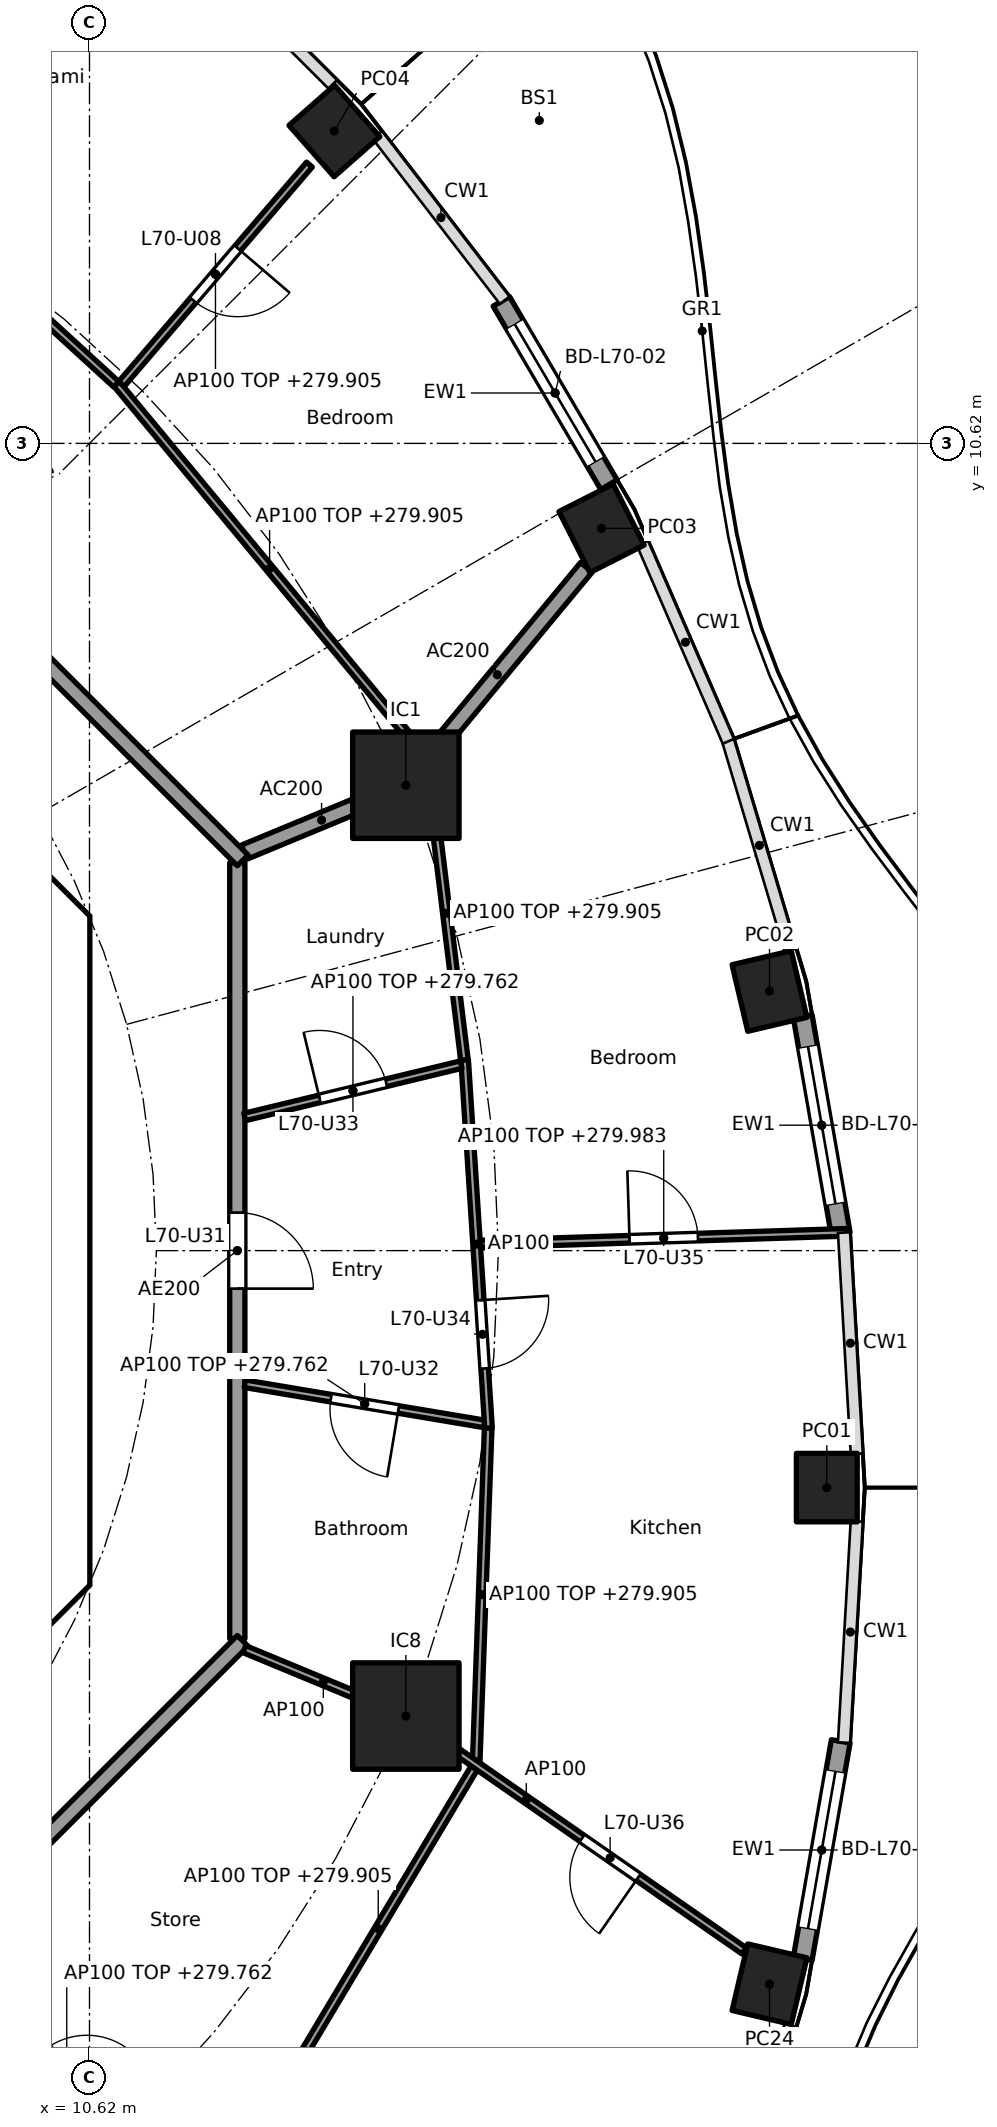
"""IFC4 building model, lengths in metres.
Left out: names, types, materials, properties, quantities, classifications, styles, units other than length and angle.
Written with IfcOpenShell. Run it as: python <this file> out.ifc"""

import sys

from ifc_helpers import new_model, si_unit, direction, frame, frame_2d, origin, origin_2d, place, context, subcontext, project, spatial, polyline, rectangle, hollow_rectangle, outline, extrude, element, fill, save


model = new_model("IFC4")
c1 = context("Model", 3, precision=1e-05, world=origin(), true_north=direction((0.0, 1.0)))
c2 = subcontext(c1, "Body", "Model", "MODEL_VIEW")
j1 = project(units=[si_unit("LENGTHUNIT", "METRE"), si_unit("PLANEANGLEUNIT", "RADIAN")], contexts=[c1])
p1 = place(None, origin())
s1 = spatial("IfcSite", under=j1, at=p1, CompositionType="ELEMENT")
p2 = place(p1, origin())
s2 = spatial("IfcBuilding", under=s1, at=p2, CompositionType="ELEMENT")
p3 = place(p2, frame((0.0, 0.0, 277.0)))
s3 = spatial("IfcBuildingStorey", under=s2, at=p3, CompositionType="ELEMENT", Elevation=277.0)
for number, where, z_axis, x_axis in (
    (1, (20.32, -3.118, 0.0), (0.0, 0.0, 1.0), (0.0, 1.0, 0.0)),
    (2, (19.566, 3.415, 0.0), (0.0, 0.0, 1.0), (-0.229, 0.973, 0.0)),
    (3, (17.356, 9.502, 0.0), (0.0, 0.0, 1.0), (-0.452, 0.892, 0.0)),
    (4, (13.841, 14.73, 0.0), (0.0, 0.0, 1.0), (-0.66, 0.751, 0.0)),
    (5, (19.566, -9.65, 0.0), (0.0, 0.0, 1.0), (0.229, 0.973, 0.0)),
):
    element("IfcColumn", number, at=place(p3, frame(where, z_axis=z_axis, x_axis=x_axis)), inside=s3, PredefinedType="COLUMN", context=c2, shape_type="SweptSolid", body=[
        extrude(hollow_rectangle(XDim=0.9, YDim=0.8, WallThickness=0.028, at=origin_2d()), origin(), (0.0, 0.0, 1.0), 3.7),
    ])
for number, where, z_axis, x_axis in (
    (6, (14.782, 6.123, 0.0), (0.0, 0.0, 1.0), (1.0, 0.0, 0.0)),
    (7, (14.782, -6.123, 0.0), (0.0, 0.0, 1.0), (1.0, 0.0, 0.0)),
):
    element("IfcColumn", number, at=place(p3, frame(where, z_axis=z_axis, x_axis=x_axis)), inside=s3, PredefinedType="COLUMN", context=c2, shape_type="SweptSolid", body=[
        extrude(rectangle(XDim=1.4, YDim=1.4, at=origin_2d()), origin(), (0.0, 0.0, 1.0), 3.7),
    ])
p4 = place(p3, frame((20.004, 3.08, 0.0), z_axis=(0.0, 0.0, 1.0), x_axis=(0.172182411767, -0.985065082661, 0.0)))
e8 = element("IfcWall", 8, at=p4, inside=s3, PredefinedType="SOLIDWALL", context=c2, shape_type="SweptSolid", body=[
    extrude(rectangle(XDim=2.903, YDim=0.25, at=frame_2d((1.451, 0.0))), origin(), (0.0, 0.0, 1.0), 3.44),
])
p5 = place(p4, frame((0.401, 0.0, 0.0)))
e9 = element("IfcOpeningElement", 9, at=p5, cuts=e8, PredefinedType="OPENING", context=c2, shape_type="SweptSolid", body=[
    extrude(rectangle(XDim=2.1, YDim=2.4, at=frame_2d((1.05, 1.2))), frame((0.0, 0.135, 0.0), z_axis=(0.0, -1.0, 0.0), x_axis=(1.0, 0.0, 0.0)), (0.0, 0.0, 1.0), 0.27),
])
p6 = place(p3, frame((16.038, 12.489, 0.0), z_axis=(0.0, 0.0, 1.0), x_axis=(0.506371364425, -0.862315511452, 0.0)))
e10 = element("IfcWall", 10, at=p6, inside=s3, PredefinedType="SOLIDWALL", context=c2, shape_type="SweptSolid", body=[
    extrude(rectangle(XDim=2.796, YDim=0.25, at=frame_2d((1.398, 0.0))), origin(), (0.0, 0.0, 1.0), 3.44),
])
p7 = place(p6, frame((0.348, 0.0, 0.0)))
e11 = element("IfcOpeningElement", 11, at=p7, cuts=e10, PredefinedType="OPENING", context=c2, shape_type="SweptSolid", body=[
    extrude(rectangle(XDim=2.1, YDim=2.4, at=frame_2d((1.05, 1.2))), frame((0.0, 0.135, 0.0), z_axis=(0.0, -1.0, 0.0), x_axis=(1.0, 0.0, 0.0)), (0.0, 0.0, 1.0), 0.27),
])
p8 = place(p3, frame((20.503, -6.456, 0.0), z_axis=(0.0, 0.0, 1.0), x_axis=(-0.172182411767, -0.985065082661, 0.0)))
e12 = element("IfcWall", 12, at=p8, inside=s3, PredefinedType="SOLIDWALL", context=c2, shape_type="SweptSolid", body=[
    extrude(rectangle(XDim=2.903, YDim=0.25, at=frame_2d((1.451, 0.0))), origin(), (0.0, 0.0, 1.0), 3.44),
])
p9 = place(p8, frame((0.401, 0.0, 0.0)))
e13 = element("IfcOpeningElement", 13, at=p9, cuts=e12, PredefinedType="OPENING", context=c2, shape_type="SweptSolid", body=[
    extrude(rectangle(XDim=2.1, YDim=2.4, at=frame_2d((1.05, 1.2))), frame((0.0, 0.135, 0.0), z_axis=(0.0, -1.0, 0.0), x_axis=(1.0, 0.0, 0.0)), (0.0, 0.0, 1.0), 0.27),
])
p10 = place(p3, frame((9.988, 4.613, 0.0), z_axis=(0.0, 0.0, 1.0), x_axis=(-0.707106781187, 0.707106781187, 0.0)))
e14 = element("IfcWall", 14, at=p10, inside=s3, PredefinedType="SHEAR", context=c2, shape_type="SweptSolid", body=[
    extrude(rectangle(XDim=7.602, YDim=0.6, at=frame_2d((3.801, 0.0))), origin(), (0.0, 0.0, 1.0), 3.44),
])
p11 = place(p10, frame((3.201, 0.0, 0.0)))
e15 = element("IfcOpeningElement", 15, at=p11, cuts=e14, PredefinedType="OPENING", context=c2, shape_type="SweptSolid", body=[
    extrude(rectangle(XDim=1.2, YDim=2.1, at=frame_2d((0.6, 1.05))), frame((0.0, 0.31, 0.0), z_axis=(0.0, -1.0, 0.0), x_axis=(1.0, 0.0, 0.0)), (0.0, 0.0, 1.0), 0.62),
])
p12 = place(p3, frame((4.613, -9.988, 0.0), z_axis=(0.0, 0.0, 1.0), x_axis=(0.707106781187, 0.707106781187, 0.0)))
e16 = element("IfcWall", 16, at=p12, inside=s3, PredefinedType="SHEAR", context=c2, shape_type="SweptSolid", body=[
    extrude(rectangle(XDim=7.602, YDim=0.6, at=frame_2d((3.801, 0.0))), origin(), (0.0, 0.0, 1.0), 3.44),
])
p13 = place(p12, frame((3.201, 0.0, 0.0)))
e17 = element("IfcOpeningElement", 17, at=p13, cuts=e16, PredefinedType="OPENING", context=c2, shape_type="SweptSolid", body=[
    extrude(rectangle(XDim=1.2, YDim=2.1, at=frame_2d((0.6, 1.05))), frame((0.0, 0.31, 0.0), z_axis=(0.0, -1.0, 0.0), x_axis=(1.0, 0.0, 0.0)), (0.0, 0.0, 1.0), 0.62),
])
p14 = place(p3, origin())
e18 = element("IfcWall", 18, at=p14, inside=s3, PredefinedType="SHEAR", context=c2, shape_type="SweptSolid", body=[
    extrude(outline(polyline([(9.776, -4.401), (10.025, -4.152), (10.025, -3.801), (10.025, 4.152), (9.776, 4.401), (10.2, 4.825), (10.625, 4.401), (10.625, -4.401), (10.2, -4.825), (9.776, -4.401)])), origin(), (0.0, 0.0, 1.0), 3.44),
])
p15 = place(p3, frame((12.657, 5.243, 0.0), z_axis=(0.0, 0.0, 1.0), x_axis=(0.923853160736, 0.382747093259, 0.0)))
e19 = element("IfcWall", 19, at=p15, inside=s3, PredefinedType="PARTITIONING", context=c2, shape_type="SweptSolid", body=[
    extrude(rectangle(XDim=2.2, YDim=0.2, at=frame_2d((1.1, 0.0))), origin(), (0.0, 0.0, 1.0), 3.44),
])
p16 = place(p3, frame((14.814, 6.161, 0.0), z_axis=(0.0, 0.0, 1.0), x_axis=(0.638050520313, 0.769994502272, 0.0)))
e20 = element("IfcWall", 20, at=p16, inside=s3, PredefinedType="PARTITIONING", context=c2, shape_type="SweptSolid", body=[
    extrude(rectangle(XDim=3.673, YDim=0.2, at=frame_2d((1.836, 0.0))), origin(), (0.0, 0.0, 1.0), 3.44),
])
p17 = place(p3, frame((12.565, -5.104, 0.0), z_axis=(0.0, 0.0, 1.0), x_axis=(0.0, 1.0, 0.0)))
e21 = element("IfcWall", 21, at=p17, inside=s3, PredefinedType="PARTITIONING", context=c2, shape_type="SweptSolid", body=[
    extrude(rectangle(XDim=10.209, YDim=0.2, at=frame_2d((5.104, 0.0))), origin(), (0.0, 0.0, 1.0), 3.44),
])
p18 = place(p17, frame((4.604, 0.0, 0.0)))
e22 = element("IfcOpeningElement", 22, at=p18, cuts=e21, PredefinedType="OPENING", context=c2, shape_type="SweptSolid", body=[
    extrude(rectangle(XDim=1.0, YDim=2.1, at=frame_2d((0.5, 1.05))), frame((0.0, 0.11, 0.0), z_axis=(0.0, -1.0, 0.0), x_axis=(1.0, 0.0, 0.0)), (0.0, 0.0, 1.0), 0.22),
])
p19 = place(p3, frame((12.635, 5.134, 0.0), z_axis=(0.0, 0.0, 1.0), x_axis=(-0.707106781187, 0.707106781187, 0.0)))
e23 = element("IfcWall", 23, at=p19, inside=s3, PredefinedType="PARTITIONING", context=c2, shape_type="SweptSolid", body=[
    extrude(rectangle(XDim=10.609, YDim=0.2, at=frame_2d((5.305, 0.0))), origin(), (0.0, 0.0, 1.0), 3.44),
])
p20 = place(p3, frame((5.275, -12.494, 0.0), z_axis=(0.0, 0.0, 1.0), x_axis=(0.707106781187, 0.707106781187, 0.0)))
e24 = element("IfcWall", 24, at=p20, inside=s3, PredefinedType="PARTITIONING", context=c2, shape_type="SweptSolid", body=[
    extrude(rectangle(XDim=10.409, YDim=0.2, at=frame_2d((5.205, 0.0))), origin(), (0.0, 0.0, 1.0), 3.44),
])
p21 = place(p3, frame((12.663, -1.751, 0.0), z_axis=(0.0, 0.0, 1.0), x_axis=(0.98626156497, -0.165191178529, 0.0)))
e25 = element("IfcWall", 25, at=p21, inside=s3, PredefinedType="PARTITIONING", context=c2, shape_type="SweptSolid", body=[
    extrude(rectangle(XDim=3.198, YDim=0.1, at=frame_2d((1.599, 0.0))), origin(), (0.0, 0.0, 1.0), 2.762),
])
p22 = place(p21, frame((1.149, 0.0, 0.0)))
e26 = element("IfcOpeningElement", 26, at=p22, cuts=e25, PredefinedType="OPENING", context=c2, shape_type="SweptSolid", body=[
    extrude(rectangle(XDim=0.9, YDim=2.1, at=frame_2d((0.45, 1.05))), frame((0.0, 0.06, 0.0), z_axis=(0.0, -1.0, 0.0), x_axis=(1.0, 0.0, 0.0)), (0.0, 0.0, 1.0), 0.12),
])
p23 = place(p3, frame((15.87, -2.338, 0.0), z_axis=(0.0, 0.0, 1.0), x_axis=(-0.064797294757, 0.997898447034, 0.0)))
e27 = element("IfcWall", 27, at=p23, inside=s3, PredefinedType="PARTITIONING", context=c2, shape_type="SweptSolid", body=[
    extrude(rectangle(XDim=4.857, YDim=0.1, at=frame_2d((2.428, 0.0))), origin(), (0.0, 0.0, 1.0), 3.44),
])
p24 = place(p23, frame((0.789, 0.0, 0.0)))
e28 = element("IfcOpeningElement", 28, at=p24, cuts=e27, PredefinedType="OPENING", context=c2, shape_type="SweptSolid", body=[
    extrude(rectangle(XDim=0.9, YDim=2.1, at=frame_2d((0.45, 1.05))), frame((0.0, 0.06, 0.0), z_axis=(0.0, -1.0, 0.0), x_axis=(1.0, 0.0, 0.0)), (0.0, 0.0, 1.0), 0.12),
])
p25 = place(p3, frame((15.865, -2.338, 0.0), z_axis=(0.0, 0.0, 1.0), x_axis=(-0.035902310383, -0.999355304238, 0.0)))
e29 = element("IfcWall", 29, at=p25, inside=s3, PredefinedType="PARTITIONING", context=c2, shape_type="SweptSolid", body=[
    extrude(rectangle(XDim=4.379, YDim=0.1, at=frame_2d((2.19, 0.0))), origin(), (0.0, 0.0, 1.0), 2.905),
])
p26 = place(p3, frame((15.763, 0.087, 0.0), z_axis=(0.0, 0.0, 1.0), x_axis=(0.999492034598, 0.03186962151, 0.0)))
e30 = element("IfcWall", 30, at=p26, inside=s3, PredefinedType="PARTITIONING", context=c2, shape_type="SweptSolid", body=[
    extrude(rectangle(XDim=4.826, YDim=0.1, at=frame_2d((2.413, 0.0))), origin(), (0.0, 0.0, 1.0), 2.983),
])
p27 = place(p26, frame((1.963, 0.0, 0.0)))
e31 = element("IfcOpeningElement", 31, at=p27, cuts=e30, PredefinedType="OPENING", context=c2, shape_type="SweptSolid", body=[
    extrude(rectangle(XDim=0.9, YDim=2.1, at=frame_2d((0.45, 1.05))), frame((0.0, 0.06, 0.0), z_axis=(0.0, -1.0, 0.0), x_axis=(1.0, 0.0, 0.0)), (0.0, 0.0, 1.0), 0.12),
])
p28 = place(p3, frame((12.662, 1.758, 0.0), z_axis=(0.0, 0.0, 1.0), x_axis=(0.972004827836, 0.234960879007, 0.0)))
e32 = element("IfcWall", 32, at=p28, inside=s3, PredefinedType="PARTITIONING", context=c2, shape_type="SweptSolid", body=[
    extrude(rectangle(XDim=2.93, YDim=0.1, at=frame_2d((1.465, 0.0))), origin(), (0.0, 0.0, 1.0), 2.762),
])
p29 = place(p28, frame((1.015, 0.0, 0.0)))
e33 = element("IfcOpeningElement", 33, at=p29, cuts=e32, PredefinedType="OPENING", context=c2, shape_type="SweptSolid", body=[
    extrude(rectangle(XDim=0.9, YDim=2.1, at=frame_2d((0.45, 1.05))), frame((0.0, 0.06, 0.0), z_axis=(0.0, -1.0, 0.0), x_axis=(1.0, 0.0, 0.0)), (0.0, 0.0, 1.0), 0.12),
])
p30 = place(p3, frame((15.552, 2.508, 0.0), z_axis=(0.0, 0.0, 1.0), x_axis=(-0.12196293976, 0.992534654974, 0.0)))
e34 = element("IfcWall", 34, at=p30, inside=s3, PredefinedType="PARTITIONING", context=c2, shape_type="SweptSolid", body=[
    extrude(rectangle(XDim=3.887, YDim=0.1, at=frame_2d((1.944, 0.0))), origin(), (0.0, 0.0, 1.0), 2.905),
])
p31 = place(p3, frame((15.002, 6.543, 0.0), z_axis=(0.0, 0.0, 1.0), x_axis=(-0.637932656528, 0.770092154054, 0.0)))
e35 = element("IfcWall", 35, at=p31, inside=s3, PredefinedType="PARTITIONING", context=c2, shape_type="SweptSolid", body=[
    extrude(rectangle(XDim=6.311, YDim=0.1, at=frame_2d((3.155, 0.0))), origin(), (0.0, 0.0, 1.0), 2.905),
])
p32 = place(p3, frame((11.041, 11.402, 0.0), z_axis=(0.0, 0.0, 1.0), x_axis=(0.650558544325, 0.759456108282, 0.0)))
e36 = element("IfcWall", 36, at=p32, inside=s3, PredefinedType="PARTITIONING", context=c2, shape_type="SweptSolid", body=[
    extrude(rectangle(XDim=3.8, YDim=0.1, at=frame_2d((1.9, 0.0))), origin(), (0.0, 0.0, 1.0), 2.905),
])
p33 = place(p32, frame((1.45, 0.0, 0.0)))
e37 = element("IfcOpeningElement", 37, at=p33, cuts=e36, PredefinedType="OPENING", context=c2, shape_type="SweptSolid", body=[
    extrude(rectangle(XDim=0.9, YDim=2.1, at=frame_2d((0.45, 1.05))), frame((0.0, 0.06, 0.0), z_axis=(0.0, -1.0, 0.0), x_axis=(1.0, 0.0, 0.0)), (0.0, 0.0, 1.0), 0.12),
])
p34 = place(p3, frame((10.972, 11.398, 0.0), z_axis=(0.0, 0.0, 1.0), x_axis=(-0.737838738013, 0.674977034193, 0.0)))
e38 = element("IfcWall", 38, at=p34, inside=s3, PredefinedType="PARTITIONING", context=c2, shape_type="SweptSolid", body=[
    extrude(rectangle(XDim=5.977, YDim=0.1, at=frame_2d((2.989, 0.0))), origin(), (0.0, 0.0, 1.0), 2.905),
])
p35 = place(p34, frame((2.514, 0.0, 0.0)))
e39 = element("IfcOpeningElement", 39, at=p35, cuts=e38, PredefinedType="OPENING", context=c2, shape_type="SweptSolid", body=[
    extrude(rectangle(XDim=0.9, YDim=2.1, at=frame_2d((0.45, 1.05))), frame((0.0, 0.06, 0.0), z_axis=(0.0, -1.0, 0.0), x_axis=(1.0, 0.0, 0.0)), (0.0, 0.0, 1.0), 0.12),
])
p36 = place(p3, frame((8.943, -8.966, 0.0), z_axis=(0.0, 0.0, 1.0), x_axis=(0.588357698232, -0.808600778463, 0.0)))
e40 = element("IfcWall", 40, at=p36, inside=s3, PredefinedType="PARTITIONING", context=c2, shape_type="SweptSolid", body=[
    extrude(rectangle(XDim=4.682, YDim=0.1, at=frame_2d((2.341, 0.0))), origin(), (0.0, 0.0, 1.0), 2.762),
])
p37 = place(p36, frame((1.891, 0.0, 0.0)))
e41 = element("IfcOpeningElement", 41, at=p37, cuts=e40, PredefinedType="OPENING", context=c2, shape_type="SweptSolid", body=[
    extrude(rectangle(XDim=0.9, YDim=2.1, at=frame_2d((0.45, 1.05))), frame((0.0, 0.06, 0.0), z_axis=(0.0, -1.0, 0.0), x_axis=(1.0, 0.0, 0.0)), (0.0, 0.0, 1.0), 0.12),
])
p38 = place(p3, frame((13.157, -11.033, 0.0), z_axis=(0.0, 0.0, 1.0), x_axis=(0.512736548388, 0.858545998737, 0.0)))
e42 = element("IfcWall", 42, at=p38, inside=s3, PredefinedType="PARTITIONING", context=c2, shape_type="SweptSolid", body=[
    extrude(rectangle(XDim=4.922, YDim=0.1, at=frame_2d((2.461, 0.0))), origin(), (0.0, 0.0, 1.0), 2.905),
])
p39 = place(p3, frame((12.657, -5.243, 0.0), z_axis=(0.0, 0.0, 1.0), x_axis=(0.923864733477, -0.382719158442, 0.0)))
e43 = element("IfcWall", 43, at=p39, inside=s3, PredefinedType="PARTITIONING", context=c2, shape_type="SweptSolid", body=[
    extrude(rectangle(XDim=2.25, YDim=0.1, at=frame_2d((1.125, 0.0))), origin(), (0.0, 0.0, 1.0), 3.44),
])
p40 = place(p3, frame((14.823, -6.151, 0.0), z_axis=(0.0, 0.0, 1.0), x_axis=(0.821435065081, -0.570302054928, 0.0)))
e44 = element("IfcWall", 44, at=p40, inside=s3, PredefinedType="PARTITIONING", context=c2, shape_type="SweptSolid", body=[
    extrude(rectangle(XDim=5.368, YDim=0.1, at=frame_2d((2.684, 0.0))), origin(), (0.0, 0.0, 1.0), 3.44),
])
p41 = place(p40, frame((2.771, 0.0, 0.0)))
e45 = element("IfcOpeningElement", 45, at=p41, cuts=e44, PredefinedType="OPENING", context=c2, shape_type="SweptSolid", body=[
    extrude(rectangle(XDim=0.9, YDim=2.1, at=frame_2d((0.45, 1.05))), frame((0.0, 0.06, 0.0), z_axis=(0.0, -1.0, 0.0), x_axis=(1.0, 0.0, 0.0)), (0.0, 0.0, 1.0), 0.12),
])
p42 = place(p5, origin())
e46 = element("IfcDoor", 46, at=p42, inside=s3, OperationType="SLIDING_TO_LEFT", PredefinedType="DOOR", context=c2, shape_type="SweptSolid", body=[
    extrude(rectangle(XDim=2.1, YDim=2.4, at=frame_2d((1.05, 1.2))), frame((0.0, 0.025, 0.0), z_axis=(0.0, -1.0, 0.0), x_axis=(1.0, 0.0, 0.0)), (0.0, 0.0, 1.0), 0.05),
])
fill(e9, e46)
p43 = place(p7, origin())
e47 = element("IfcDoor", 47, at=p43, inside=s3, OperationType="SLIDING_TO_LEFT", PredefinedType="DOOR", context=c2, shape_type="SweptSolid", body=[
    extrude(rectangle(XDim=2.1, YDim=2.4, at=frame_2d((1.05, 1.2))), frame((0.0, 0.025, 0.0), z_axis=(0.0, -1.0, 0.0), x_axis=(1.0, 0.0, 0.0)), (0.0, 0.0, 1.0), 0.05),
])
fill(e11, e47)
p44 = place(p9, origin())
e48 = element("IfcDoor", 48, at=p44, inside=s3, OperationType="SLIDING_TO_LEFT", PredefinedType="DOOR", context=c2, shape_type="SweptSolid", body=[
    extrude(rectangle(XDim=2.1, YDim=2.4, at=frame_2d((1.05, 1.2))), frame((0.0, 0.025, 0.0), z_axis=(0.0, -1.0, 0.0), x_axis=(1.0, 0.0, 0.0)), (0.0, 0.0, 1.0), 0.05),
])
fill(e13, e48)
p45 = place(p33, frame((0.9, 0.0, 0.0), x_axis=(-1.0, 0.0, 0.0)))
e49 = element("IfcDoor", 49, at=p45, inside=s3, OperationType="SINGLE_SWING_LEFT", PredefinedType="DOOR", context=c2, shape_type="SweptSolid", body=[
    extrude(rectangle(XDim=0.9, YDim=2.1, at=frame_2d((0.45, 1.05))), frame((0.0, 0.025, 0.0), z_axis=(0.0, -1.0, 0.0), x_axis=(1.0, 0.0, 0.0)), (0.0, 0.0, 1.0), 0.05),
])
fill(e37, e49)
p46 = place(p18, frame((1.0, 0.0, 0.0), x_axis=(-1.0, 0.0, 0.0)))
e50 = element("IfcDoor", 50, at=p46, inside=s3, OperationType="SINGLE_SWING_RIGHT", PredefinedType="DOOR", context=c2, shape_type="SweptSolid", body=[
    extrude(rectangle(XDim=1.0, YDim=2.1, at=frame_2d((0.5, 1.05))), frame((0.0, 0.025, 0.0), z_axis=(0.0, -1.0, 0.0), x_axis=(1.0, 0.0, 0.0)), (0.0, 0.0, 1.0), 0.05),
])
fill(e22, e50)
p47 = place(p22, frame((0.9, 0.0, 0.0), x_axis=(-1.0, 0.0, 0.0)))
e51 = element("IfcDoor", 51, at=p47, inside=s3, OperationType="SINGLE_SWING_LEFT", PredefinedType="DOOR", context=c2, shape_type="SweptSolid", body=[
    extrude(rectangle(XDim=0.9, YDim=2.1, at=frame_2d((0.45, 1.05))), frame((0.0, 0.025, 0.0), z_axis=(0.0, -1.0, 0.0), x_axis=(1.0, 0.0, 0.0)), (0.0, 0.0, 1.0), 0.05),
])
fill(e26, e51)
p48 = place(p29, origin())
e52 = element("IfcDoor", 52, at=p48, inside=s3, OperationType="SINGLE_SWING_LEFT", PredefinedType="DOOR", context=c2, shape_type="SweptSolid", body=[
    extrude(rectangle(XDim=0.9, YDim=2.1, at=frame_2d((0.45, 1.05))), frame((0.0, 0.025, 0.0), z_axis=(0.0, -1.0, 0.0), x_axis=(1.0, 0.0, 0.0)), (0.0, 0.0, 1.0), 0.05),
])
fill(e33, e52)
p49 = place(p24, frame((0.9, 0.0, 0.0), x_axis=(-1.0, 0.0, 0.0)))
e53 = element("IfcDoor", 53, at=p49, inside=s3, OperationType="SINGLE_SWING_LEFT", PredefinedType="DOOR", context=c2, shape_type="SweptSolid", body=[
    extrude(rectangle(XDim=0.9, YDim=2.1, at=frame_2d((0.45, 1.05))), frame((0.0, 0.025, 0.0), z_axis=(0.0, -1.0, 0.0), x_axis=(1.0, 0.0, 0.0)), (0.0, 0.0, 1.0), 0.05),
])
fill(e28, e53)
p50 = place(p27, origin())
e54 = element("IfcDoor", 54, at=p50, inside=s3, OperationType="SINGLE_SWING_LEFT", PredefinedType="DOOR", context=c2, shape_type="SweptSolid", body=[
    extrude(rectangle(XDim=0.9, YDim=2.1, at=frame_2d((0.45, 1.05))), frame((0.0, 0.025, 0.0), z_axis=(0.0, -1.0, 0.0), x_axis=(1.0, 0.0, 0.0)), (0.0, 0.0, 1.0), 0.05),
])
fill(e31, e54)
p51 = place(p41, frame((0.9, 0.0, 0.0), x_axis=(-1.0, 0.0, 0.0)))
e55 = element("IfcDoor", 55, at=p51, inside=s3, OperationType="SINGLE_SWING_LEFT", PredefinedType="DOOR", context=c2, shape_type="SweptSolid", body=[
    extrude(rectangle(XDim=0.9, YDim=2.1, at=frame_2d((0.45, 1.05))), frame((0.0, 0.025, 0.0), z_axis=(0.0, -1.0, 0.0), x_axis=(1.0, 0.0, 0.0)), (0.0, 0.0, 1.0), 0.05),
])
fill(e45, e55)
p52 = place(p37, origin())
e56 = element("IfcDoor", 56, at=p52, inside=s3, OperationType="SINGLE_SWING_RIGHT", PredefinedType="DOOR", context=c2, shape_type="SweptSolid", body=[
    extrude(rectangle(XDim=0.9, YDim=2.1, at=frame_2d((0.45, 1.05))), frame((0.0, 0.025, 0.0), z_axis=(0.0, -1.0, 0.0), x_axis=(1.0, 0.0, 0.0)), (0.0, 0.0, 1.0), 0.05),
])
fill(e41, e56)
save(model, sys.argv[1])
